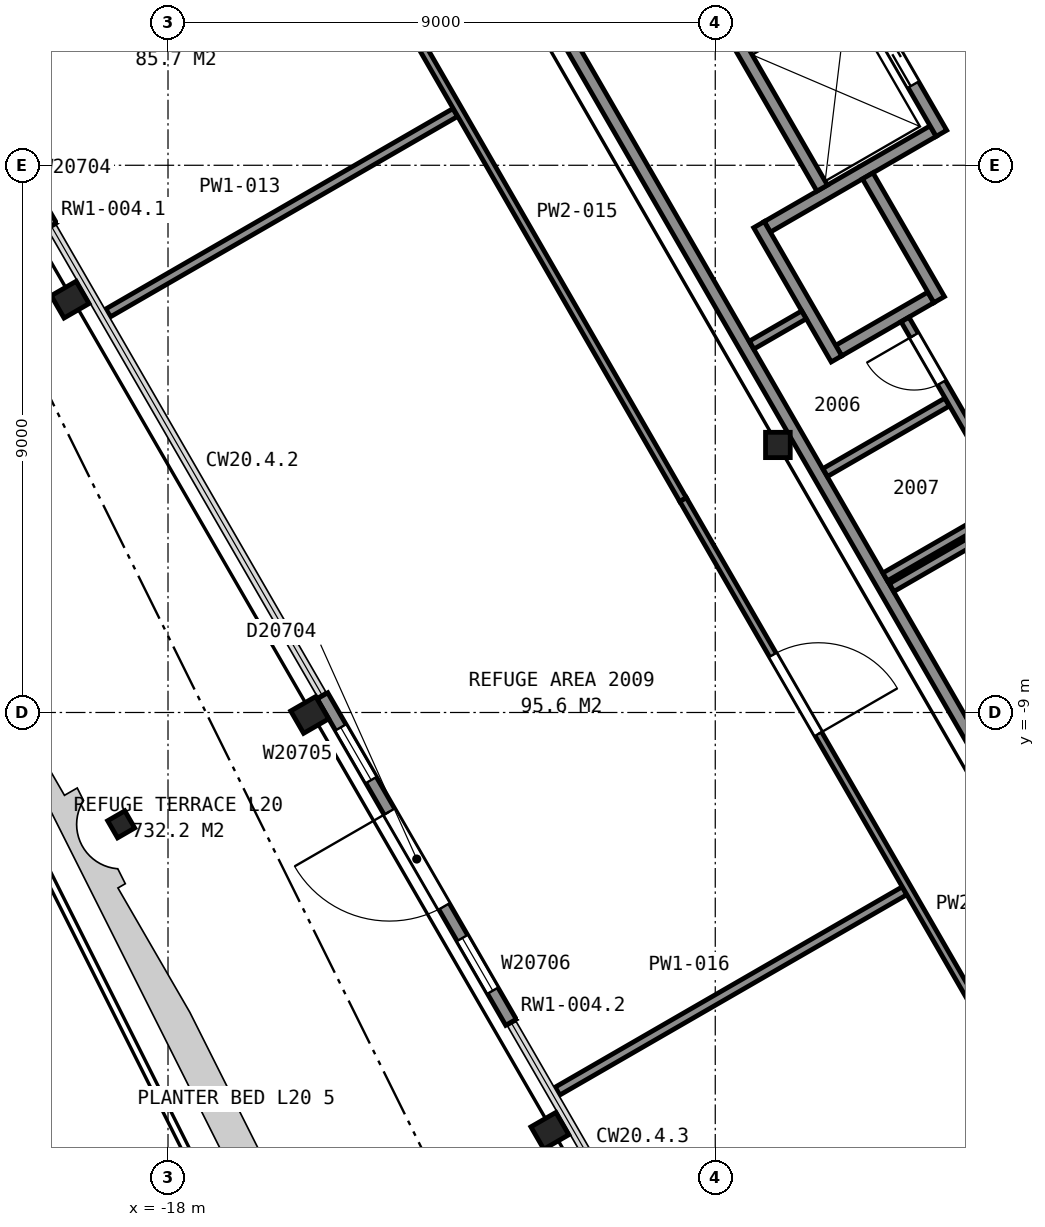
"""IFC4 building model, lengths in metres.
Left out: names, types, materials, properties, quantities, classifications, styles, units other than length and angle.
Written with IfcOpenShell. Run it as: python <this file> out.ifc"""

import sys

from ifc_helpers import new_model, si_unit, direction, frame, frame_2d, origin, origin_2d, place, context, subcontext, project, spatial, rectangle, hollow_circle, i_section, extrude, element, fill, save


model = new_model("IFC4")
c1 = context("Model", 3, precision=1e-05, world=origin(), true_north=direction((0.0, 1.0)))
c2 = subcontext(c1, "Body", "Model", "MODEL_VIEW")
j1 = project(units=[si_unit("LENGTHUNIT", "METRE"), si_unit("PLANEANGLEUNIT", "RADIAN")], contexts=[c1])
p1 = place(None, origin())
s1 = spatial("IfcSite", under=j1, at=p1, CompositionType="ELEMENT")
p2 = place(p1, origin())
s2 = spatial("IfcBuilding", under=s1, at=p2, CompositionType="ELEMENT")
p3 = place(p2, frame((0.0, 0.0, 87.2)))
s3 = spatial("IfcBuildingStorey", under=s2, at=p3, CompositionType="ELEMENT", Elevation=87.2)
for number, where, z_axis, x_axis in (
    (1, (-19.61, -2.21, -0.16), (0.0, 0.0, 1.0), (-0.5, 0.866, 0.0)),
    (2, (-15.67, -9.04, -0.16), (0.0, 0.0, 1.0), (-0.5, 0.866, 0.0)),
    (3, (-11.72, -15.88, -0.16), (0.0, 0.0, 1.0), (-0.5, 0.866, 0.0)),
):
    element("IfcColumn", number, at=place(p3, frame(where, z_axis=z_axis, x_axis=x_axis)), inside=s3, PredefinedType="COLUMN", context=c2, shape_type="SweptSolid", body=[
        extrude(i_section(OverallWidth=0.424, OverallDepth=0.475, WebThickness=0.048, FlangeThickness=0.077, FilletRadius=0.015, at=origin_2d()), origin(), (0.0, 0.0, 1.0), 5.76),
    ])
p4 = place(p3, frame((-7.97, -4.6, 0.0), z_axis=(0.0, 0.0, 1.0), x_axis=(1.0, 0.0, 0.0)))
e4 = element("IfcColumn", 4, at=p4, inside=s3, PredefinedType="COLUMN", context=c2, shape_type="SweptSolid", body=[
    extrude(i_section(OverallWidth=0.406, OverallDepth=0.417, WebThickness=0.03, FlangeThickness=0.048, FilletRadius=0.015, at=origin_2d()), origin(), (0.0, 0.0, 1.0), 5.6),
])
p5 = place(p3, frame((-18.77, -10.84, -0.73), z_axis=(0.0, 0.0, 1.0), x_axis=(-0.5, 0.866025403784, 0.0)))
e5 = element("IfcColumn", 5, at=p5, inside=s3, PredefinedType="COLUMN", context=c2, shape_type="SweptSolid", body=[
    extrude(hollow_circle(Radius=0.163, WallThickness=0.013, at=origin_2d()), origin(), (0.0, 0.0, 1.0), 5.17),
])
p6 = place(p3, frame((-23.022, 4.373, 0.0), z_axis=(0.0, 0.0, 1.0), x_axis=(0.500009909098, -0.866019682689, 0.0)))
e6 = element("IfcWall", 6, at=p6, inside=s3, PredefinedType="SOLIDWALL", context=c2, shape_type="SweptSolid", body=[
    extrude(rectangle(XDim=6.2, YDim=0.2, at=frame_2d((3.1, 0.0))), origin(), (0.0, 0.0, 1.0), 4.323),
])
p7 = place(p6, frame((0.6, 0.0, 0.9)))
e7 = element("IfcOpeningElement", 7, at=p7, cuts=e6, PredefinedType="OPENING", context=c2, shape_type="SweptSolid", body=[
    extrude(rectangle(XDim=1.0, YDim=1.5, at=frame_2d((0.5, 0.75))), frame((0.0, 0.11, 0.0), z_axis=(0.0, -1.0, 0.0), x_axis=(1.0, 0.0, 0.0)), (0.0, 0.0, 1.0), 0.22),
])
p8 = place(p6, frame((2.2, 0.0, 0.0)))
e8 = element("IfcOpeningElement", 8, at=p8, cuts=e6, PredefinedType="OPENING", context=c2, shape_type="SweptSolid", body=[
    extrude(rectangle(XDim=1.8, YDim=2.4, at=frame_2d((0.9, 1.2))), frame((0.0, 0.11, 0.0), z_axis=(0.0, -1.0, 0.0), x_axis=(1.0, 0.0, 0.0)), (0.0, 0.0, 1.0), 0.22),
])
p9 = place(p6, frame((4.6, 0.0, 0.9)))
e9 = element("IfcOpeningElement", 9, at=p9, cuts=e6, PredefinedType="OPENING", context=c2, shape_type="SweptSolid", body=[
    extrude(rectangle(XDim=1.0, YDim=1.5, at=frame_2d((0.5, 0.75))), frame((0.0, 0.11, 0.0), z_axis=(0.0, -1.0, 0.0), x_axis=(1.0, 0.0, 0.0)), (0.0, 0.0, 1.0), 0.22),
])
p10 = place(p3, frame((-15.459, -8.726, 0.0), z_axis=(0.0, 0.0, 1.0), x_axis=(0.500009909098, -0.866019682689, 0.0)))
e10 = element("IfcWall", 10, at=p10, inside=s3, PredefinedType="SOLIDWALL", context=c2, shape_type="SweptSolid", body=[
    extrude(rectangle(XDim=6.2, YDim=0.2, at=frame_2d((3.1, 0.0))), origin(), (0.0, 0.0, 1.0), 4.323),
])
p11 = place(p10, frame((0.6, 0.0, 0.9)))
e11 = element("IfcOpeningElement", 11, at=p11, cuts=e10, PredefinedType="OPENING", context=c2, shape_type="SweptSolid", body=[
    extrude(rectangle(XDim=1.0, YDim=1.5, at=frame_2d((0.5, 0.75))), frame((0.0, 0.11, 0.0), z_axis=(0.0, -1.0, 0.0), x_axis=(1.0, 0.0, 0.0)), (0.0, 0.0, 1.0), 0.22),
])
p12 = place(p10, frame((2.2, 0.0, 0.0)))
e12 = element("IfcOpeningElement", 12, at=p12, cuts=e10, PredefinedType="OPENING", context=c2, shape_type="SweptSolid", body=[
    extrude(rectangle(XDim=1.8, YDim=2.4, at=frame_2d((0.9, 1.2))), frame((0.0, 0.11, 0.0), z_axis=(0.0, -1.0, 0.0), x_axis=(1.0, 0.0, 0.0)), (0.0, 0.0, 1.0), 0.22),
])
p13 = place(p10, frame((4.6, 0.0, 0.9)))
e13 = element("IfcOpeningElement", 13, at=p13, cuts=e10, PredefinedType="OPENING", context=c2, shape_type="SweptSolid", body=[
    extrude(rectangle(XDim=1.0, YDim=1.5, at=frame_2d((0.5, 0.75))), frame((0.0, 0.11, 0.0), z_axis=(0.0, -1.0, 0.0), x_axis=(1.0, 0.0, 0.0)), (0.0, 0.0, 1.0), 0.22),
])
p14 = place(p3, frame((-6.97, -3.048, 0.0), z_axis=(0.0, 0.0, 1.0), x_axis=(0.866036909293, 0.499980071345, 0.0)))
e14 = element("IfcWall", 14, at=p14, inside=s3, PredefinedType="PARTITIONING", context=c2, shape_type="SweptSolid", body=[
    extrude(rectangle(XDim=1.75, YDim=0.2, at=frame_2d((0.875, 0.0))), origin(), (0.0, 0.0, 1.0), 5.6),
])
p15 = place(p3, frame((-8.145, -1.013, 0.0), z_axis=(0.0, 0.0, 1.0), x_axis=(0.866016494683, 0.500015430699, 0.0)))
e15 = element("IfcWall", 15, at=p15, inside=s3, PredefinedType="PARTITIONING", context=c2, shape_type="SweptSolid", body=[
    extrude(rectangle(XDim=3.15, YDim=0.2, at=frame_2d((1.575, 0.0))), origin(), (0.0, 0.0, 1.0), 5.6),
])
p16 = place(p3, frame((-5.28, 0.525, 0.0), z_axis=(0.0, 0.0, 1.0), x_axis=(-0.500037662692, 0.866003658127, 0.0)))
e16 = element("IfcWall", 16, at=p16, inside=s3, PredefinedType="PARTITIONING", context=c2, shape_type="SweptSolid", body=[
    extrude(rectangle(XDim=2.95, YDim=0.2, at=frame_2d((1.475, 0.0))), origin(), (0.0, 0.0, 1.0), 5.6),
])
p17 = place(p16, frame((0.925, 0.0, 0.0)))
e17 = element("IfcOpeningElement", 17, at=p17, cuts=e16, PredefinedType="OPENING", context=c2, shape_type="SweptSolid", body=[
    extrude(rectangle(XDim=1.1, YDim=2.1, at=frame_2d((0.55, 1.05))), frame((0.0, 0.11, 0.0), z_axis=(0.0, -1.0, 0.0), x_axis=(1.0, 0.0, 0.0)), (0.0, 0.0, 1.0), 0.22),
])
p18 = place(p3, frame((-5.318, -2.21, 0.0), z_axis=(0.0, 0.0, 1.0), x_axis=(-0.499938297808, 0.866061024631, 0.0)))
e18 = element("IfcWall", 18, at=p18, inside=s3, PredefinedType="PARTITIONING", context=c2, shape_type="SweptSolid", body=[
    extrude(rectangle(XDim=2.35, YDim=0.2, at=frame_2d((1.175, 0.0))), origin(), (0.0, 0.0, 1.0), 5.6),
])
p19 = place(p3, frame((-7.242, -0.376, 0.0), z_axis=(0.0, 0.0, 1.0), x_axis=(-0.499996545922, 0.866027397988, 0.0)))
e19 = element("IfcWall", 19, at=p19, inside=s3, PredefinedType="PARTITIONING", context=c2, shape_type="SweptSolid", body=[
    extrude(rectangle(XDim=2.75, YDim=0.2, at=frame_2d((1.375, 0.0))), origin(), (0.0, 0.0, 1.0), 5.6),
])
p20 = place(p3, frame((-7.006, -3.185, 0.0), z_axis=(0.0, 0.0, 1.0), x_axis=(-0.499990435942, 0.866030925526, 0.0)))
e20 = element("IfcWall", 20, at=p20, inside=s3, PredefinedType="PARTITIONING", context=c2, shape_type="SweptSolid", body=[
    extrude(rectangle(XDim=2.55, YDim=0.2, at=frame_2d((1.275, 0.0))), origin(), (0.0, 0.0, 1.0), 5.6),
])
p21 = place(p3, frame((-13.664, 5.946, 0.0), z_axis=(0.0, 0.0, 1.0), x_axis=(0.499994327219, -0.866028678941, 0.0)))
e21 = element("IfcWall", 21, at=p21, inside=s3, PredefinedType="PARTITIONING", context=c2, shape_type="SweptSolid", body=[
    extrude(rectangle(XDim=23.968, YDim=0.2, at=frame_2d((11.984, 0.0))), origin(), (0.0, 0.0, 1.0), 5.35),
])
p22 = place(p3, frame((-8.402, -2.958, 0.0), z_axis=(0.0, 0.0, 1.0), x_axis=(0.866025935826, 0.499999078476, 0.0)))
e22 = element("IfcWall", 22, at=p22, inside=s3, PredefinedType="PARTITIONING", context=c2, shape_type="SweptSolid", body=[
    extrude(rectangle(XDim=0.993, YDim=0.15, at=frame_2d((0.497, 0.0))), origin(), (0.0, 0.0, 1.0), 5.35),
])
p23 = place(p3, frame((-7.192, -5.053, 0.0), z_axis=(0.0, 0.0, 1.0), x_axis=(0.865851878631, 0.500300434011, 0.0)))
e23 = element("IfcWall", 23, at=p23, inside=s3, PredefinedType="PARTITIONING", context=c2, shape_type="SweptSolid", body=[
    extrude(rectangle(XDim=2.315, YDim=0.15, at=frame_2d((1.158, 0.0))), origin(), (0.0, 0.0, 1.0), 5.35),
])
p24 = place(p3, frame((-6.206, -6.77, 0.0), z_axis=(0.0, 0.0, 1.0), x_axis=(0.865998469481, 0.500046648681, 0.0)))
e24 = element("IfcWall", 24, at=p24, inside=s3, PredefinedType="PARTITIONING", context=c2, shape_type="SweptSolid", body=[
    extrude(rectangle(XDim=2.325, YDim=0.15, at=frame_2d((1.163, 0.0))), origin(), (0.0, 0.0, 1.0), 5.35),
])
p25 = place(p3, frame((-6.1, -6.946, 0.0), z_axis=(0.0, 0.0, 1.0), x_axis=(0.866038200431, 0.499977834903, 0.0)))
e25 = element("IfcWall", 25, at=p25, inside=s3, PredefinedType="PARTITIONING", context=c2, shape_type="SweptSolid", body=[
    extrude(rectangle(XDim=4.22, YDim=0.15, at=frame_2d((2.11, 0.0))), origin(), (0.0, 0.0, 1.0), 5.35),
])
p26 = place(p3, frame((-4.091, -5.635, 0.0), z_axis=(0.0, 0.0, 1.0), x_axis=(-0.499948934428, 0.866054884499, 0.0)))
e26 = element("IfcWall", 26, at=p26, inside=s3, PredefinedType="PARTITIONING", context=c2, shape_type="SweptSolid", body=[
    extrude(rectangle(XDim=3.577, YDim=0.15, at=frame_2d((1.789, 0.0))), origin(), (0.0, 0.0, 1.0), 5.35),
])
p27 = place(p26, frame((2.377, 0.0, 0.0)))
e27 = element("IfcOpeningElement", 27, at=p27, cuts=e26, PredefinedType="OPENING", context=c2, shape_type="SweptSolid", body=[
    extrude(rectangle(XDim=0.9, YDim=2.1, at=frame_2d((0.45, 1.05))), frame((0.0, 0.085, 0.0), z_axis=(0.0, -1.0, 0.0), x_axis=(1.0, 0.0, 0.0)), (0.0, 0.0, 1.0), 0.17),
])
p28 = place(p26, frame((0.605, 0.0, 0.0)))
e28 = element("IfcOpeningElement", 28, at=p28, cuts=e26, PredefinedType="OPENING", context=c2, shape_type="SweptSolid", body=[
    extrude(rectangle(XDim=0.9, YDim=2.1, at=frame_2d((0.45, 1.05))), frame((0.0, 0.085, 0.0), z_axis=(0.0, -1.0, 0.0), x_axis=(1.0, 0.0, 0.0)), (0.0, 0.0, 1.0), 0.17),
])
p29 = place(p3, frame((-18.985, -2.428, 0.0), z_axis=(0.0, 0.0, 1.0), x_axis=(0.866064687971, 0.499931951619, 0.0)))
e29 = element("IfcWall", 29, at=p29, inside=s3, PredefinedType="PARTITIONING", context=c2, shape_type="SweptSolid", body=[
    extrude(rectangle(XDim=6.591, YDim=0.15, at=frame_2d((3.295, 0.0))), origin(), (0.0, 0.0, 1.0), 4.262),
])
p30 = place(p3, frame((-14.979, 3.956, 0.0), z_axis=(0.0, 0.0, 1.0), x_axis=(0.499335058772, -0.866408967568, 0.0)))
e30 = element("IfcWall", 30, at=p30, inside=s3, PredefinedType="PARTITIONING", context=c2, shape_type="SweptSolid", body=[
    extrude(rectangle(XDim=10.913, YDim=0.125, at=frame_2d((5.457, 0.0))), origin(), (0.0, 0.0, 1.0), 4.262),
])
p31 = place(p3, frame((-11.595, -15.227, 0.0), z_axis=(0.0, 0.0, 1.0), x_axis=(0.866055429303, 0.49994799067, 0.0)))
e31 = element("IfcWall", 31, at=p31, inside=s3, PredefinedType="PARTITIONING", context=c2, shape_type="SweptSolid", body=[
    extrude(rectangle(XDim=6.591, YDim=0.15, at=frame_2d((3.295, 0.0))), origin(), (0.0, 0.0, 1.0), 4.262),
])
p32 = place(p3, frame((-4.069, -14.956, 0.0), z_axis=(0.0, 0.0, 1.0), x_axis=(-0.500012742938, 0.866018046521, 0.0)))
e32 = element("IfcWall", 32, at=p32, inside=s3, PredefinedType="PARTITIONING", context=c2, shape_type="SweptSolid", body=[
    extrude(rectangle(XDim=10.92, YDim=0.125, at=frame_2d((5.46, 0.0))), origin(), (0.0, 0.0, 1.0), 4.262),
])
p33 = place(p32, frame((6.47, 0.0, 0.0)))
e33 = element("IfcOpeningElement", 33, at=p33, cuts=e32, PredefinedType="OPENING", context=c2, shape_type="SweptSolid", body=[
    extrude(rectangle(XDim=1.5, YDim=2.1, at=frame_2d((0.75, 1.05))), frame((0.0, 0.073, 0.0), z_axis=(0.0, -1.0, 0.0), x_axis=(1.0, 0.0, 0.0)), (0.0, 0.0, 1.0), 0.145),
])
p34 = place(p11, origin())
e34 = element("IfcWindow", 34, at=p34, inside=s3, PartitioningType="SINGLE_PANEL", PredefinedType="WINDOW", context=c2, shape_type="SweptSolid", body=[
    extrude(rectangle(XDim=1.0, YDim=1.5, at=frame_2d((0.5, 0.75))), frame((0.0, 0.03, 0.0), z_axis=(0.0, -1.0, 0.0), x_axis=(1.0, 0.0, 0.0)), (0.0, 0.0, 1.0), 0.06),
])
fill(e11, e34)
p35 = place(p12, frame((1.8, 0.0, 0.0), z_axis=(0.0, 0.0, 1.0), x_axis=(-1.0, 0.0, 0.0)))
e35 = element("IfcDoor", 35, at=p35, inside=s3, OperationType="DOUBLE_DOOR_SINGLE_SWING", PredefinedType="DOOR", context=c2, shape_type="SweptSolid", body=[
    extrude(rectangle(XDim=1.8, YDim=2.4, at=frame_2d((0.9, 1.2))), frame((0.0, 0.025, 0.0), z_axis=(0.0, -1.0, 0.0), x_axis=(1.0, 0.0, 0.0)), (0.0, 0.0, 1.0), 0.05),
])
fill(e12, e35)
p36 = place(p13, origin())
e36 = element("IfcWindow", 36, at=p36, inside=s3, PartitioningType="SINGLE_PANEL", PredefinedType="WINDOW", context=c2, shape_type="SweptSolid", body=[
    extrude(rectangle(XDim=1.0, YDim=1.5, at=frame_2d((0.5, 0.75))), frame((0.0, 0.03, 0.0), z_axis=(0.0, -1.0, 0.0), x_axis=(1.0, 0.0, 0.0)), (0.0, 0.0, 1.0), 0.06),
])
fill(e13, e36)
p37 = place(p17, origin())
e37 = element("IfcDoor", 37, at=p37, inside=s3, OperationType="SLIDING_TO_LEFT", PredefinedType="DOOR", context=c2, shape_type="SweptSolid", body=[
    extrude(rectangle(XDim=1.1, YDim=2.1, at=frame_2d((0.55, 1.05))), frame((0.0, 0.025, 0.0), z_axis=(0.0, -1.0, 0.0), x_axis=(1.0, 0.0, 0.0)), (0.0, 0.0, 1.0), 0.05),
])
fill(e17, e37)
p38 = place(p27, origin())
e38 = element("IfcDoor", 38, at=p38, inside=s3, OperationType="SINGLE_SWING_RIGHT", PredefinedType="DOOR", context=c2, shape_type="SweptSolid", body=[
    extrude(rectangle(XDim=0.9, YDim=2.1, at=frame_2d((0.45, 1.05))), frame((0.0, 0.025, 0.0), z_axis=(0.0, -1.0, 0.0), x_axis=(1.0, 0.0, 0.0)), (0.0, 0.0, 1.0), 0.05),
])
fill(e27, e38)
p39 = place(p33, origin())
e39 = element("IfcDoor", 39, at=p39, inside=s3, OperationType="DOUBLE_DOOR_SINGLE_SWING", PredefinedType="DOOR", context=c2, shape_type="SweptSolid", body=[
    extrude(rectangle(XDim=1.5, YDim=2.1, at=frame_2d((0.75, 1.05))), frame((0.0, 0.025, 0.0), z_axis=(0.0, -1.0, 0.0), x_axis=(1.0, 0.0, 0.0)), (0.0, 0.0, 1.0), 0.05),
])
fill(e33, e39)
save(model, sys.argv[1])
